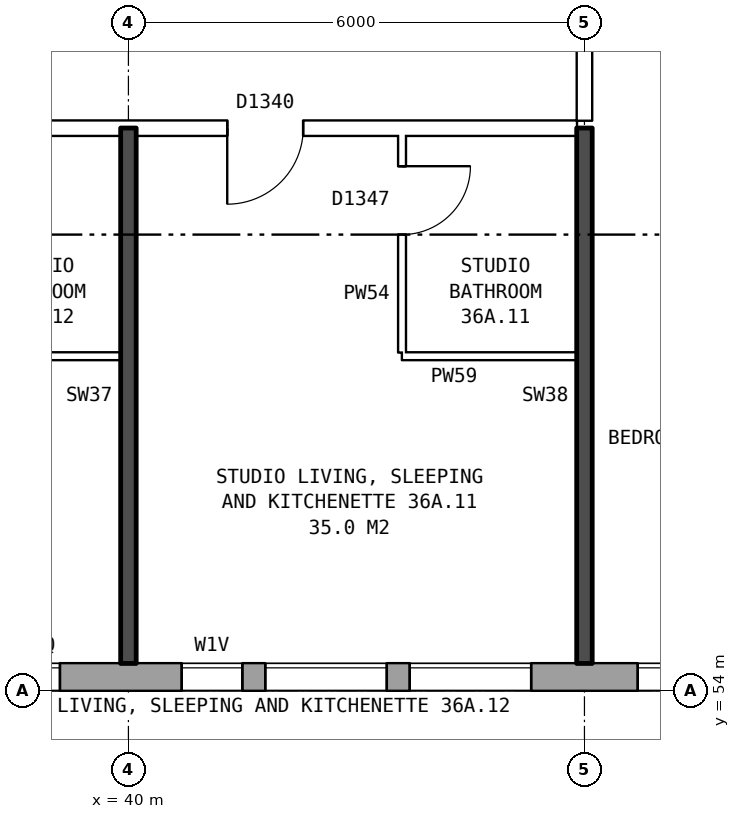
"""IFC4 building model, lengths in metres.
Left out: names, types, materials, properties, quantities, classifications, styles, units other than length and angle.
Written with IfcOpenShell. Run it as: python <this file> out.ifc"""

import sys

from ifc_helpers import new_model, si_unit, direction, frame, frame_2d, origin, place, context, subcontext, project, spatial, rectangle, extrude, element, fill, save


model = new_model("IFC4")
c1 = context("Model", 3, precision=1e-05, world=origin(), true_north=direction((0.0, 1.0)))
c2 = subcontext(c1, "Body", "Model", "MODEL_VIEW")
j1 = project(units=[si_unit("LENGTHUNIT", "METRE"), si_unit("PLANEANGLEUNIT", "RADIAN")], contexts=[c1])
p1 = place(None, origin())
s1 = spatial("IfcSite", under=j1, at=p1, CompositionType="ELEMENT")
p2 = place(p1, origin())
s2 = spatial("IfcBuilding", under=s1, at=p2, CompositionType="ELEMENT")
p3 = place(p2, frame((0.0, 0.0, 129.9)))
s3 = spatial("IfcBuildingStorey", under=s2, at=p3, CompositionType="ELEMENT", Elevation=129.9)
p4 = place(p3, frame((29.825, 54.18, 0.0), z_axis=(0.0, 0.0, 1.0), x_axis=(1.0, 0.0, 0.0)))
e1 = element("IfcWall", 1, at=p4, inside=s3, PredefinedType="STANDARD", context=c2, shape_type="SweptSolid", body=[
    extrude(rectangle(XDim=43.101, YDim=0.36, at=frame_2d((21.55, 0.0))), origin(), (0.0, 0.0, 1.0), 2.85),
])
p5 = place(p4, frame((1.875, 0.0, 0.8)))
e2 = element("IfcOpeningElement", 2, at=p5, cuts=e1, PredefinedType="OPENING", context=c2, shape_type="SweptSolid", body=[
    extrude(rectangle(XDim=1.6, YDim=1.8, at=frame_2d((0.8, 0.9))), frame((0.0, 0.19, 0.0), z_axis=(0.0, -1.0, 0.0), x_axis=(1.0, 0.0, 0.0)), (0.0, 0.0, 1.0), 0.38),
])
p6 = place(p4, frame((4.875, 0.0, 0.8)))
e3 = element("IfcOpeningElement", 3, at=p6, cuts=e1, PredefinedType="OPENING", context=c2, shape_type="SweptSolid", body=[
    extrude(rectangle(XDim=1.6, YDim=1.8, at=frame_2d((0.8, 0.9))), frame((0.0, 0.19, 0.0), z_axis=(0.0, -1.0, 0.0), x_axis=(1.0, 0.0, 0.0)), (0.0, 0.0, 1.0), 0.38),
])
p7 = place(p4, frame((6.775, 0.0, 0.8)))
e4 = element("IfcOpeningElement", 4, at=p7, cuts=e1, PredefinedType="OPENING", context=c2, shape_type="SweptSolid", body=[
    extrude(rectangle(XDim=1.6, YDim=1.8, at=frame_2d((0.8, 0.9))), frame((0.0, 0.19, 0.0), z_axis=(0.0, -1.0, 0.0), x_axis=(1.0, 0.0, 0.0)), (0.0, 0.0, 1.0), 0.38),
])
p8 = place(p4, frame((10.875, 0.0, 0.8)))
e5 = element("IfcOpeningElement", 5, at=p8, cuts=e1, PredefinedType="OPENING", context=c2, shape_type="SweptSolid", body=[
    extrude(rectangle(XDim=0.8, YDim=0.9, at=frame_2d((0.4, 0.45))), frame((0.0, 0.19, 0.0), z_axis=(0.0, -1.0, 0.0), x_axis=(1.0, 0.0, 0.0)), (0.0, 0.0, 1.0), 0.38),
])
p9 = place(p4, frame((13.875, 0.0, 0.8)))
e6 = element("IfcOpeningElement", 6, at=p9, cuts=e1, PredefinedType="OPENING", context=c2, shape_type="SweptSolid", body=[
    extrude(rectangle(XDim=1.6, YDim=1.8, at=frame_2d((0.8, 0.9))), frame((0.0, 0.19, 0.0), z_axis=(0.0, -1.0, 0.0), x_axis=(1.0, 0.0, 0.0)), (0.0, 0.0, 1.0), 0.38),
])
p10 = place(p4, frame((16.875, 0.0, 0.8)))
e7 = element("IfcOpeningElement", 7, at=p10, cuts=e1, PredefinedType="OPENING", context=c2, shape_type="SweptSolid", body=[
    extrude(rectangle(XDim=1.6, YDim=1.8, at=frame_2d((0.8, 0.9))), frame((0.0, 0.19, 0.0), z_axis=(0.0, -1.0, 0.0), x_axis=(1.0, 0.0, 0.0)), (0.0, 0.0, 1.0), 0.38),
])
p11 = place(p4, frame((19.875, 0.0, 0.8)))
e8 = element("IfcOpeningElement", 8, at=p11, cuts=e1, PredefinedType="OPENING", context=c2, shape_type="SweptSolid", body=[
    extrude(rectangle(XDim=1.6, YDim=1.8, at=frame_2d((0.8, 0.9))), frame((0.0, 0.19, 0.0), z_axis=(0.0, -1.0, 0.0), x_axis=(1.0, 0.0, 0.0)), (0.0, 0.0, 1.0), 0.38),
])
p12 = place(p4, frame((22.875, 0.0, 0.8)))
e9 = element("IfcOpeningElement", 9, at=p12, cuts=e1, PredefinedType="OPENING", context=c2, shape_type="SweptSolid", body=[
    extrude(rectangle(XDim=1.6, YDim=1.8, at=frame_2d((0.8, 0.9))), frame((0.0, 0.19, 0.0), z_axis=(0.0, -1.0, 0.0), x_axis=(1.0, 0.0, 0.0)), (0.0, 0.0, 1.0), 0.38),
])
p13 = place(p4, frame((25.875, 0.0, 0.8)))
e10 = element("IfcOpeningElement", 10, at=p13, cuts=e1, PredefinedType="OPENING", context=c2, shape_type="SweptSolid", body=[
    extrude(rectangle(XDim=1.6, YDim=1.8, at=frame_2d((0.8, 0.9))), frame((0.0, 0.19, 0.0), z_axis=(0.0, -1.0, 0.0), x_axis=(1.0, 0.0, 0.0)), (0.0, 0.0, 1.0), 0.38),
])
p14 = place(p4, frame((28.875, 0.0, 0.8)))
e11 = element("IfcOpeningElement", 11, at=p14, cuts=e1, PredefinedType="OPENING", context=c2, shape_type="SweptSolid", body=[
    extrude(rectangle(XDim=1.6, YDim=1.8, at=frame_2d((0.8, 0.9))), frame((0.0, 0.19, 0.0), z_axis=(0.0, -1.0, 0.0), x_axis=(1.0, 0.0, 0.0)), (0.0, 0.0, 1.0), 0.38),
])
p15 = place(p4, frame((31.325, 0.0, 0.15)))
e12 = element("IfcOpeningElement", 12, at=p15, cuts=e1, PredefinedType="OPENING", context=c2, shape_type="SweptSolid", body=[
    extrude(rectangle(XDim=0.6, YDim=1.8, at=frame_2d((0.3, 0.9))), frame((0.0, 0.19, 0.0), z_axis=(0.0, -1.0, 0.0), x_axis=(1.0, 0.0, 0.0)), (0.0, 0.0, 1.0), 0.38),
])
p16 = place(p4, frame((34.875, 0.0, 0.8)))
e13 = element("IfcOpeningElement", 13, at=p16, cuts=e1, PredefinedType="OPENING", context=c2, shape_type="SweptSolid", body=[
    extrude(rectangle(XDim=1.6, YDim=1.8, at=frame_2d((0.8, 0.9))), frame((0.0, 0.19, 0.0), z_axis=(0.0, -1.0, 0.0), x_axis=(1.0, 0.0, 0.0)), (0.0, 0.0, 1.0), 0.38),
])
p17 = place(p4, frame((37.875, 0.0, 0.8)))
e14 = element("IfcOpeningElement", 14, at=p17, cuts=e1, PredefinedType="OPENING", context=c2, shape_type="SweptSolid", body=[
    extrude(rectangle(XDim=1.6, YDim=1.8, at=frame_2d((0.8, 0.9))), frame((0.0, 0.19, 0.0), z_axis=(0.0, -1.0, 0.0), x_axis=(1.0, 0.0, 0.0)), (0.0, 0.0, 1.0), 0.38),
])
p18 = place(p4, frame((40.875, 0.0, 0.8)))
e15 = element("IfcOpeningElement", 15, at=p18, cuts=e1, PredefinedType="OPENING", context=c2, shape_type="SweptSolid", body=[
    extrude(rectangle(XDim=1.6, YDim=1.8, at=frame_2d((0.8, 0.9))), frame((0.0, 0.19, 0.0), z_axis=(0.0, -1.0, 0.0), x_axis=(1.0, 0.0, 0.0)), (0.0, 0.0, 1.0), 0.38),
])
p19 = place(p4, frame((8.675, 0.0, 1.3)))
e16 = element("IfcOpeningElement", 16, at=p19, cuts=e1, PredefinedType="OPENING", context=c2, shape_type="SweptSolid", body=[
    extrude(rectangle(XDim=0.6, YDim=1.2, at=frame_2d((0.3, 0.6))), frame((0.0, 0.19, 0.0), z_axis=(0.0, -1.0, 0.0), x_axis=(1.0, 0.0, 0.0)), (0.0, 0.0, 1.0), 0.38),
])
p20 = place(p4, frame((11.975, 0.0, 0.8)))
e17 = element("IfcOpeningElement", 17, at=p20, cuts=e1, PredefinedType="OPENING", context=c2, shape_type="SweptSolid", body=[
    extrude(rectangle(XDim=1.6, YDim=1.8, at=frame_2d((0.8, 0.9))), frame((0.0, 0.19, 0.0), z_axis=(0.0, -1.0, 0.0), x_axis=(1.0, 0.0, 0.0)), (0.0, 0.0, 1.0), 0.38),
])
p21 = place(p4, frame((32.225, 0.0, 0.25)))
e18 = element("IfcOpeningElement", 18, at=p21, cuts=e1, PredefinedType="OPENING", context=c2, shape_type="SweptSolid", body=[
    extrude(rectangle(XDim=0.6, YDim=0.9, at=frame_2d((0.3, 0.45))), frame((0.0, 0.19, 0.0), z_axis=(0.0, -1.0, 0.0), x_axis=(1.0, 0.0, 0.0)), (0.0, 0.0, 1.0), 0.38),
])
for number, where, z_axis, x_axis in (
    (19, (37.6, 58.4, 0.0), (0.0, 0.0, 1.0), (1.0, 0.0, 0.0)),
    (20, (43.6, 58.4, 0.0), (0.0, 0.0, 1.0), (1.0, 0.0, 0.0)),
):
    element("IfcWall", number, at=place(p3, frame(where, z_axis=z_axis, x_axis=x_axis)), inside=s3, PredefinedType="PARTITIONING", context=c2, shape_type="SweptSolid", body=[
        extrude(rectangle(XDim=2.3, YDim=0.1, at=frame_2d((1.15, 0.0))), origin(), (0.0, 0.0, 1.0), 2.85),
    ])
p22 = place(p3, frame((27.11, 61.4, 0.0), z_axis=(0.0, 0.0, 1.0), x_axis=(1.0, 0.0, 0.0)))
e21 = element("IfcWall", 21, at=p22, inside=s3, PredefinedType="PARTITIONING", context=c2, shape_type="SweptSolid", body=[
    extrude(rectangle(XDim=18.79, YDim=0.2, at=frame_2d((9.395, 0.0))), origin(), (0.0, 0.0, 1.0), 2.85),
])
p23 = place(p22, frame((14.19, 0.0, 0.0)))
e22 = element("IfcOpeningElement", 22, at=p23, cuts=e21, PredefinedType="OPENING", context=c2, shape_type="SweptSolid", body=[
    extrude(rectangle(XDim=1.0, YDim=2.1, at=frame_2d((0.5, 1.05))), frame((0.0, 0.11, 0.0), z_axis=(0.0, -1.0, 0.0), x_axis=(1.0, 0.0, 0.0)), (0.0, 0.0, 1.0), 0.22),
])
p24 = place(p22, frame((8.19, 0.0, 0.0)))
e23 = element("IfcOpeningElement", 23, at=p24, cuts=e21, PredefinedType="OPENING", context=c2, shape_type="SweptSolid", body=[
    extrude(rectangle(XDim=1.0, YDim=2.1, at=frame_2d((0.5, 1.05))), frame((0.0, 0.11, 0.0), z_axis=(0.0, -1.0, 0.0), x_axis=(1.0, 0.0, 0.0)), (0.0, 0.0, 1.0), 0.22),
])
p25 = place(p22, frame((1.745, 0.0, 0.0)))
e24 = element("IfcOpeningElement", 24, at=p25, cuts=e21, PredefinedType="OPENING", context=c2, shape_type="SweptSolid", body=[
    extrude(rectangle(XDim=1.0, YDim=2.1, at=frame_2d((0.5, 1.05))), frame((0.0, 0.11, 0.0), z_axis=(0.0, -1.0, 0.0), x_axis=(1.0, 0.0, 0.0)), (0.0, 0.0, 1.0), 0.22),
])
p26 = place(p3, frame((40.0, 54.36, 0.0), z_axis=(0.0, 0.0, 1.0), x_axis=(0.0, 1.0, 0.0)))
e25 = element("IfcWall", 25, at=p26, inside=s3, PredefinedType="SOLIDWALL", context=c2, shape_type="SweptSolid", body=[
    extrude(rectangle(XDim=7.04, YDim=0.2, at=frame_2d((3.52, 0.0))), origin(), (0.0, 0.0, 1.0), 2.85),
])
p27 = place(p3, frame((43.6, 58.45, 0.0), z_axis=(0.0, 0.0, 1.0), x_axis=(0.0, 1.0, 0.0)))
e26 = element("IfcWall", 26, at=p27, inside=s3, PredefinedType="PARTITIONING", context=c2, shape_type="SweptSolid", body=[
    extrude(rectangle(XDim=2.85, YDim=0.1, at=frame_2d((1.425, 0.0))), origin(), (0.0, 0.0, 1.0), 2.85),
])
p28 = place(p27, frame((1.55, 0.0, 0.0)))
e27 = element("IfcOpeningElement", 27, at=p28, cuts=e26, PredefinedType="OPENING", context=c2, shape_type="SweptSolid", body=[
    extrude(rectangle(XDim=0.9, YDim=2.1, at=frame_2d((0.45, 1.05))), frame((0.0, 0.06, 0.0), z_axis=(0.0, -1.0, 0.0), x_axis=(1.0, 0.0, 0.0)), (0.0, 0.0, 1.0), 0.12),
])
p29 = place(p3, frame((46.0, 54.36, 0.0), z_axis=(0.0, 0.0, 1.0), x_axis=(0.0, 1.0, 0.0)))
e28 = element("IfcWall", 28, at=p29, inside=s3, PredefinedType="SOLIDWALL", context=c2, shape_type="SweptSolid", body=[
    extrude(rectangle(XDim=7.04, YDim=0.2, at=frame_2d((3.52, 0.0))), origin(), (0.0, 0.0, 1.0), 2.85),
])
p30 = place(p3, frame((46.0, 61.5, 0.0), z_axis=(0.0, 0.0, 1.0), x_axis=(0.0, 1.0, 0.0)))
e29 = element("IfcWall", 29, at=p30, inside=s3, PredefinedType="PARTITIONING", context=c2, shape_type="SweptSolid", body=[
    extrude(rectangle(XDim=2.2, YDim=0.2, at=frame_2d((1.1, 0.0))), origin(), (0.0, 0.0, 1.0), 2.85),
])
p31 = place(p8, origin())
e30 = element("IfcWindow", 30, at=p31, inside=s3, PartitioningType="SINGLE_PANEL", PredefinedType="WINDOW", context=c2, shape_type="SweptSolid", body=[
    extrude(rectangle(XDim=0.8, YDim=0.9, at=frame_2d((0.4, 0.45))), frame((0.0, 0.15, 0.0), z_axis=(0.0, -1.0, 0.0), x_axis=(1.0, 0.0, 0.0)), (0.0, 0.0, 1.0), 0.06),
])
fill(e5, e30)
p32 = place(p9, origin())
e31 = element("IfcWindow", 31, at=p32, inside=s3, PartitioningType="SINGLE_PANEL", PredefinedType="WINDOW", context=c2, shape_type="SweptSolid", body=[
    extrude(rectangle(XDim=1.6, YDim=1.8, at=frame_2d((0.8, 0.9))), frame((0.0, 0.15, 0.0), z_axis=(0.0, -1.0, 0.0), x_axis=(1.0, 0.0, 0.0)), (0.0, 0.0, 1.0), 0.06),
])
fill(e6, e31)
p33 = place(p10, origin())
e32 = element("IfcWindow", 32, at=p33, inside=s3, PartitioningType="SINGLE_PANEL", PredefinedType="WINDOW", context=c2, shape_type="SweptSolid", body=[
    extrude(rectangle(XDim=1.6, YDim=1.8, at=frame_2d((0.8, 0.9))), frame((0.0, 0.15, 0.0), z_axis=(0.0, -1.0, 0.0), x_axis=(1.0, 0.0, 0.0)), (0.0, 0.0, 1.0), 0.06),
])
fill(e7, e32)
p34 = place(p23, frame((1.0, 0.0, 0.0), z_axis=(0.0, 0.0, 1.0), x_axis=(-1.0, 0.0, 0.0)))
e33 = element("IfcDoor", 33, at=p34, inside=s3, OperationType="SINGLE_SWING_RIGHT", PredefinedType="DOOR", context=c2, shape_type="SweptSolid", body=[
    extrude(rectangle(XDim=1.0, YDim=2.1, at=frame_2d((0.5, 1.05))), frame((0.0, 0.025, 0.0), z_axis=(0.0, -1.0, 0.0), x_axis=(1.0, 0.0, 0.0)), (0.0, 0.0, 1.0), 0.05),
])
fill(e22, e33)
p35 = place(p28, frame((0.9, 0.0, 0.0), z_axis=(0.0, 0.0, 1.0), x_axis=(-1.0, 0.0, 0.0)))
e34 = element("IfcDoor", 34, at=p35, inside=s3, OperationType="SINGLE_SWING_LEFT", PredefinedType="DOOR", context=c2, shape_type="SweptSolid", body=[
    extrude(rectangle(XDim=0.9, YDim=2.1, at=frame_2d((0.45, 1.05))), frame((0.0, 0.025, 0.0), z_axis=(0.0, -1.0, 0.0), x_axis=(1.0, 0.0, 0.0)), (0.0, 0.0, 1.0), 0.05),
])
fill(e27, e34)
p36 = place(p19, origin())
e35 = element("IfcWindow", 35, at=p36, inside=s3, PartitioningType="SINGLE_PANEL", PredefinedType="WINDOW", context=c2, shape_type="SweptSolid", body=[
    extrude(rectangle(XDim=0.6, YDim=1.2, at=frame_2d((0.3, 0.6))), frame((0.0, 0.15, 0.0), z_axis=(0.0, -1.0, 0.0), x_axis=(1.0, 0.0, 0.0)), (0.0, 0.0, 1.0), 0.06),
])
fill(e16, e35)
p37 = place(p20, origin())
e36 = element("IfcWindow", 36, at=p37, inside=s3, PartitioningType="SINGLE_PANEL", PredefinedType="WINDOW", context=c2, shape_type="SweptSolid", body=[
    extrude(rectangle(XDim=1.6, YDim=1.8, at=frame_2d((0.8, 0.9))), frame((0.0, 0.15, 0.0), z_axis=(0.0, -1.0, 0.0), x_axis=(1.0, 0.0, 0.0)), (0.0, 0.0, 1.0), 0.06),
])
fill(e17, e36)
save(model, sys.argv[1])
